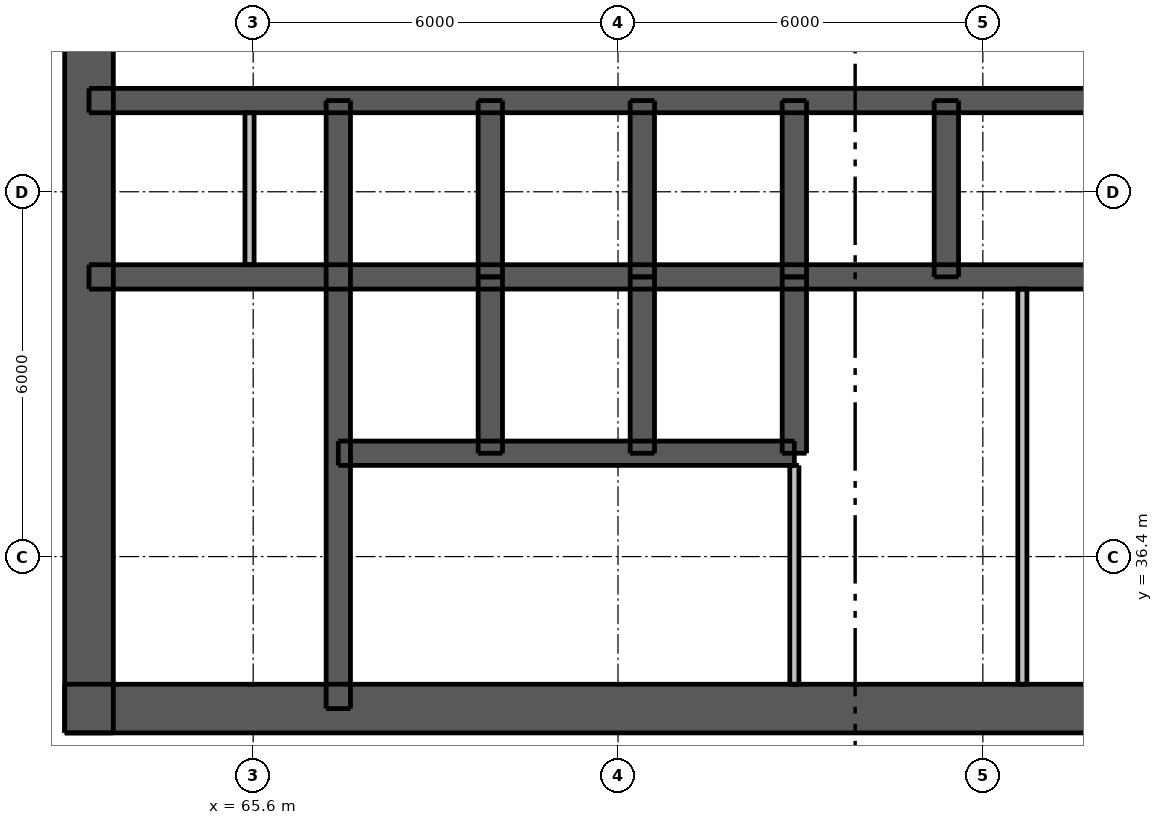
"""IFC4 building model, lengths in metres.
Left out: names, types, materials, properties, quantities, classifications, styles, units other than length and angle.
Written with IfcOpenShell. Run it as: python <this file> out.ifc"""

import sys

from ifc_helpers import new_model, si_unit, direction, frame, frame_2d, origin, place, context, subcontext, project, spatial, rectangle, extrude, element, fill, save


model = new_model("IFC4")
c1 = context("Model", 3, precision=1e-05, world=origin(), true_north=direction((0.0, 1.0)))
c2 = subcontext(c1, "Body", "Model", "MODEL_VIEW")
j1 = project(units=[si_unit("LENGTHUNIT", "METRE"), si_unit("PLANEANGLEUNIT", "RADIAN")], contexts=[c1])
p1 = place(None, origin())
s1 = spatial("IfcSite", under=j1, at=p1, CompositionType="ELEMENT")
p2 = place(p1, origin())
s2 = spatial("IfcBuilding", under=s1, at=p2, CompositionType="ELEMENT")
p3 = place(p2, frame((0.0, 0.0, 95.2)))
s3 = spatial("IfcBuildingStorey", under=s2, at=p3, CompositionType="ELEMENT", Elevation=95.2)
p4 = place(p3, frame((62.5, 33.9, 0.0), z_axis=(0.0, 0.0, 1.0), x_axis=(1.0, 0.0, 0.0)))
e1 = element("IfcWall", 1, at=p4, inside=s3, PredefinedType="SHEAR", context=c2, shape_type="SweptSolid", body=[
    extrude(rectangle(XDim=24.0, YDim=0.8, at=frame_2d((12.0, 0.0))), origin(), (0.0, 0.0, 1.0), 3.05),
])
p5 = place(p4, frame((2.0, 0.0, 0.0)))
e2 = element("IfcOpeningElement", 2, at=p5, cuts=e1, PredefinedType="OPENING", context=c2, shape_type="SweptSolid", body=[
    extrude(rectangle(XDim=1.1, YDim=2.1, at=frame_2d((0.55, 1.05))), frame((0.0, 0.41, 0.0), z_axis=(0.0, -1.0, 0.0), x_axis=(1.0, 0.0, 0.0)), (0.0, 0.0, 1.0), 0.82),
])
p6 = place(p4, frame((20.9, 0.0, 0.0)))
e3 = element("IfcOpeningElement", 3, at=p6, cuts=e1, PredefinedType="OPENING", context=c2, shape_type="SweptSolid", body=[
    extrude(rectangle(XDim=1.1, YDim=2.1, at=frame_2d((0.55, 1.05))), frame((0.0, 0.41, 0.0), z_axis=(0.0, -1.0, 0.0), x_axis=(1.0, 0.0, 0.0)), (0.0, 0.0, 1.0), 0.82),
])
p7 = place(p4, frame((8.0, 0.0, 0.0)))
e4 = element("IfcOpeningElement", 4, at=p7, cuts=e1, PredefinedType="OPENING", context=c2, shape_type="SweptSolid", body=[
    extrude(rectangle(XDim=1.1, YDim=2.1, at=frame_2d((0.55, 1.05))), frame((0.0, 0.41, 0.0), z_axis=(0.0, -1.0, 0.0), x_axis=(1.0, 0.0, 0.0)), (0.0, 0.0, 1.0), 0.82),
])
p8 = place(p4, frame((13.525, 0.0, 0.0)))
e5 = element("IfcOpeningElement", 5, at=p8, cuts=e1, PredefinedType="OPENING", context=c2, shape_type="SweptSolid", body=[
    extrude(rectangle(XDim=0.9, YDim=2.1, at=frame_2d((0.45, 1.05))), frame((0.0, 0.41, 0.0), z_axis=(0.0, -1.0, 0.0), x_axis=(1.0, 0.0, 0.0)), (0.0, 0.0, 1.0), 0.82),
])
p9 = place(p4, frame((17.075, 0.0, 0.0)))
e6 = element("IfcOpeningElement", 6, at=p9, cuts=e1, PredefinedType="OPENING", context=c2, shape_type="SweptSolid", body=[
    extrude(rectangle(XDim=0.9, YDim=2.1, at=frame_2d((0.45, 1.05))), frame((0.0, 0.41, 0.0), z_axis=(0.0, -1.0, 0.0), x_axis=(1.0, 0.0, 0.0)), (0.0, 0.0, 1.0), 0.82),
])
p10 = place(p3, frame((62.9, 33.5, 0.0), z_axis=(0.0, 0.0, 1.0), x_axis=(0.0, 1.0, 0.0)))
e7 = element("IfcWall", 7, at=p10, inside=s3, PredefinedType="SHEAR", context=c2, shape_type="SweptSolid", body=[
    extrude(rectangle(XDim=24.0, YDim=0.8, at=frame_2d((12.0, 0.0))), origin(), (0.0, 0.0, 1.0), 3.05),
])
p11 = place(p10, frame((11.2, 0.0, 0.0)))
e8 = element("IfcOpeningElement", 8, at=p11, cuts=e7, PredefinedType="OPENING", context=c2, shape_type="SweptSolid", body=[
    extrude(rectangle(XDim=1.6, YDim=2.1, at=frame_2d((0.8, 1.05))), frame((0.0, 0.41, 0.0), z_axis=(0.0, -1.0, 0.0), x_axis=(1.0, 0.0, 0.0)), (0.0, 0.0, 1.0), 0.82),
])
p12 = place(p3, frame((62.9, 41.0, 0.0), z_axis=(0.0, 0.0, 1.0), x_axis=(1.0, 0.0, 0.0)))
e9 = element("IfcWall", 9, at=p12, inside=s3, PredefinedType="SHEAR", context=c2, shape_type="SweptSolid", body=[
    extrude(rectangle(XDim=23.2, YDim=0.4, at=frame_2d((11.6, 0.0))), origin(), (0.0, 0.0, 1.0), 3.05),
])
p13 = place(p3, frame((62.9, 43.9, 0.0), z_axis=(0.0, 0.0, 1.0), x_axis=(1.0, 0.0, 0.0)))
e10 = element("IfcWall", 10, at=p13, inside=s3, PredefinedType="SHEAR", context=c2, shape_type="SweptSolid", body=[
    extrude(rectangle(XDim=23.2, YDim=0.4, at=frame_2d((11.6, 0.0))), origin(), (0.0, 0.0, 1.0), 3.05),
])
p14 = place(p13, frame((1.07, 0.0, 0.0)))
e11 = element("IfcOpeningElement", 11, at=p14, cuts=e10, PredefinedType="OPENING", context=c2, shape_type="SweptSolid", body=[
    extrude(rectangle(XDim=0.9, YDim=2.1, at=frame_2d((0.45, 1.05))), frame((0.0, 0.21, 0.0), z_axis=(0.0, -1.0, 0.0), x_axis=(1.0, 0.0, 0.0)), (0.0, 0.0, 1.0), 0.42),
])
p15 = place(p13, frame((2.87, 0.0, 0.0)))
e12 = element("IfcOpeningElement", 12, at=p15, cuts=e10, PredefinedType="OPENING", context=c2, shape_type="SweptSolid", body=[
    extrude(rectangle(XDim=0.8, YDim=2.1, at=frame_2d((0.4, 1.05))), frame((0.0, 0.21, 0.0), z_axis=(0.0, -1.0, 0.0), x_axis=(1.0, 0.0, 0.0)), (0.0, 0.0, 1.0), 0.42),
])
p16 = place(p13, frame((20.6, 0.0, 0.0)))
e13 = element("IfcOpeningElement", 13, at=p16, cuts=e10, PredefinedType="OPENING", context=c2, shape_type="SweptSolid", body=[
    extrude(rectangle(XDim=0.9, YDim=2.1, at=frame_2d((0.45, 1.05))), frame((0.0, 0.21, 0.0), z_axis=(0.0, -1.0, 0.0), x_axis=(1.0, 0.0, 0.0)), (0.0, 0.0, 1.0), 0.42),
])
p17 = place(p13, frame((4.8, 0.0, 0.0)))
e14 = element("IfcOpeningElement", 14, at=p17, cuts=e10, PredefinedType="OPENING", context=c2, shape_type="SweptSolid", body=[
    extrude(rectangle(XDim=1.1, YDim=2.1, at=frame_2d((0.55, 1.05))), frame((0.0, 0.21, 0.0), z_axis=(0.0, -1.0, 0.0), x_axis=(1.0, 0.0, 0.0)), (0.0, 0.0, 1.0), 0.42),
])
p18 = place(p13, frame((7.3, 0.0, 0.0)))
e15 = element("IfcOpeningElement", 15, at=p18, cuts=e10, PredefinedType="OPENING", context=c2, shape_type="SweptSolid", body=[
    extrude(rectangle(XDim=1.1, YDim=2.1, at=frame_2d((0.55, 1.05))), frame((0.0, 0.21, 0.0), z_axis=(0.0, -1.0, 0.0), x_axis=(1.0, 0.0, 0.0)), (0.0, 0.0, 1.0), 0.42),
])
p19 = place(p13, frame((9.8, 0.0, 0.0)))
e16 = element("IfcOpeningElement", 16, at=p19, cuts=e10, PredefinedType="OPENING", context=c2, shape_type="SweptSolid", body=[
    extrude(rectangle(XDim=1.1, YDim=2.1, at=frame_2d((0.55, 1.05))), frame((0.0, 0.21, 0.0), z_axis=(0.0, -1.0, 0.0), x_axis=(1.0, 0.0, 0.0)), (0.0, 0.0, 1.0), 0.42),
])
p20 = place(p13, frame((12.3, 0.0, 0.0)))
e17 = element("IfcOpeningElement", 17, at=p20, cuts=e10, PredefinedType="OPENING", context=c2, shape_type="SweptSolid", body=[
    extrude(rectangle(XDim=1.1, YDim=2.1, at=frame_2d((0.55, 1.05))), frame((0.0, 0.21, 0.0), z_axis=(0.0, -1.0, 0.0), x_axis=(1.0, 0.0, 0.0)), (0.0, 0.0, 1.0), 0.42),
])
p21 = place(p13, frame((14.8, 0.0, 0.0)))
e18 = element("IfcOpeningElement", 18, at=p21, cuts=e10, PredefinedType="OPENING", context=c2, shape_type="SweptSolid", body=[
    extrude(rectangle(XDim=1.1, YDim=2.1, at=frame_2d((0.55, 1.05))), frame((0.0, 0.21, 0.0), z_axis=(0.0, -1.0, 0.0), x_axis=(1.0, 0.0, 0.0)), (0.0, 0.0, 1.0), 0.42),
])
p22 = place(p13, frame((17.3, 0.0, 0.0)))
e19 = element("IfcOpeningElement", 19, at=p22, cuts=e10, PredefinedType="OPENING", context=c2, shape_type="SweptSolid", body=[
    extrude(rectangle(XDim=1.1, YDim=2.1, at=frame_2d((0.55, 1.05))), frame((0.0, 0.21, 0.0), z_axis=(0.0, -1.0, 0.0), x_axis=(1.0, 0.0, 0.0)), (0.0, 0.0, 1.0), 0.42),
])
p23 = place(p3, frame((67.0, 33.9, 0.0), z_axis=(0.0, 0.0, 1.0), x_axis=(0.0, 1.0, 0.0)))
e20 = element("IfcWall", 20, at=p23, inside=s3, PredefinedType="SHEAR", context=c2, shape_type="SweptSolid", body=[
    extrude(rectangle(XDim=10.0, YDim=0.4, at=frame_2d((5.0, 0.0))), origin(), (0.0, 0.0, 1.0), 3.05),
])
p24 = place(p23, frame((0.6, 0.0, 0.0)))
e21 = element("IfcOpeningElement", 21, at=p24, cuts=e20, PredefinedType="OPENING", context=c2, shape_type="SweptSolid", body=[
    extrude(rectangle(XDim=1.1, YDim=2.1, at=frame_2d((0.55, 1.05))), frame((0.0, 0.21, 0.0), z_axis=(0.0, -1.0, 0.0), x_axis=(1.0, 0.0, 0.0)), (0.0, 0.0, 1.0), 0.42),
])
for number, where, z_axis, x_axis in (
    (22, (69.5, 41.0, 0.0), (0.0, 0.0, 1.0), (0.0, 1.0, 0.0)),
    (23, (72.0, 41.0, 0.0), (0.0, 0.0, 1.0), (0.0, 1.0, 0.0)),
    (24, (74.5, 41.0, 0.0), (0.0, 0.0, 1.0), (0.0, 1.0, 0.0)),
    (25, (77.0, 41.0, 0.0), (0.0, 0.0, 1.0), (0.0, 1.0, 0.0)),
):
    element("IfcWall", number, at=place(p3, frame(where, z_axis=z_axis, x_axis=x_axis)), inside=s3, PredefinedType="SHEAR", context=c2, shape_type="SweptSolid", body=[
        extrude(rectangle(XDim=2.9, YDim=0.4, at=frame_2d((1.45, 0.0))), origin(), (0.0, 0.0, 1.0), 3.05),
    ])
p25 = place(p3, frame((67.0, 38.1, 0.0), z_axis=(0.0, 0.0, 1.0), x_axis=(1.0, 0.0, 0.0)))
e26 = element("IfcWall", 26, at=p25, inside=s3, PredefinedType="SHEAR", context=c2, shape_type="SweptSolid", body=[
    extrude(rectangle(XDim=7.5, YDim=0.4, at=frame_2d((3.75, 0.0))), origin(), (0.0, 0.0, 1.0), 3.05),
])
p26 = place(p25, frame((0.7, 0.0, 0.0)))
e27 = element("IfcOpeningElement", 27, at=p26, cuts=e26, PredefinedType="OPENING", context=c2, shape_type="SweptSolid", body=[
    extrude(rectangle(XDim=1.1, YDim=2.1, at=frame_2d((0.55, 1.05))), frame((0.0, 0.21, 0.0), z_axis=(0.0, -1.0, 0.0), x_axis=(1.0, 0.0, 0.0)), (0.0, 0.0, 1.0), 0.42),
])
p27 = place(p25, frame((3.2, 0.0, 0.0)))
e28 = element("IfcOpeningElement", 28, at=p27, cuts=e26, PredefinedType="OPENING", context=c2, shape_type="SweptSolid", body=[
    extrude(rectangle(XDim=1.1, YDim=2.1, at=frame_2d((0.55, 1.05))), frame((0.0, 0.21, 0.0), z_axis=(0.0, -1.0, 0.0), x_axis=(1.0, 0.0, 0.0)), (0.0, 0.0, 1.0), 0.42),
])
p28 = place(p25, frame((5.65, 0.0, 0.0)))
e29 = element("IfcOpeningElement", 29, at=p28, cuts=e26, PredefinedType="OPENING", context=c2, shape_type="SweptSolid", body=[
    extrude(rectangle(XDim=1.2, YDim=2.1, at=frame_2d((0.6, 1.05))), frame((0.0, 0.21, 0.0), z_axis=(0.0, -1.0, 0.0), x_axis=(1.0, 0.0, 0.0)), (0.0, 0.0, 1.0), 0.42),
])
for number, where, z_axis, x_axis in (
    (30, (69.5, 38.1, 0.0), (0.0, 0.0, 1.0), (0.0, 1.0, 0.0)),
    (31, (72.0, 38.1, 0.0), (0.0, 0.0, 1.0), (0.0, 1.0, 0.0)),
    (32, (74.5, 38.1, 0.0), (0.0, 0.0, 1.0), (0.0, 1.0, 0.0)),
):
    element("IfcWall", number, at=place(p3, frame(where, z_axis=z_axis, x_axis=x_axis)), inside=s3, PredefinedType="SHEAR", context=c2, shape_type="SweptSolid", body=[
        extrude(rectangle(XDim=2.9, YDim=0.4, at=frame_2d((1.45, 0.0))), origin(), (0.0, 0.0, 1.0), 3.05),
    ])
p29 = place(p3, frame((74.5, 34.3, 0.0), z_axis=(0.0, 0.0, 1.0), x_axis=(0.0, 1.0, 0.0)))
e33 = element("IfcWall", 33, at=p29, inside=s3, PredefinedType="PLUMBINGWALL", context=c2, shape_type="SweptSolid", body=[
    extrude(rectangle(XDim=3.6, YDim=0.15, at=frame_2d((1.8, 0.0))), origin(), (0.0, 0.0, 1.0), 3.05),
])
p30 = place(p3, frame((78.25, 34.3, 0.0), z_axis=(0.0, 0.0, 1.0), x_axis=(0.0, 1.0, 0.0)))
e34 = element("IfcWall", 34, at=p30, inside=s3, PredefinedType="PLUMBINGWALL", context=c2, shape_type="SweptSolid", body=[
    extrude(rectangle(XDim=6.5, YDim=0.15, at=frame_2d((3.25, 0.0))), origin(), (0.0, 0.0, 1.0), 3.05),
])
p31 = place(p3, frame((65.54, 41.2, 0.0), z_axis=(0.0, 0.0, 1.0), x_axis=(0.0, 1.0, 0.0)))
e35 = element("IfcWall", 35, at=p31, inside=s3, PredefinedType="PLUMBINGWALL", context=c2, shape_type="SweptSolid", body=[
    extrude(rectangle(XDim=2.5, YDim=0.15, at=frame_2d((1.25, 0.0))), origin(), (0.0, 0.0, 1.0), 3.05),
])
p32 = place(p5, origin())
e36 = element("IfcDoor", 36, at=p32, inside=s3, OperationType="SINGLE_SWING_LEFT", PredefinedType="DOOR", context=c2, shape_type="SweptSolid", body=[
    extrude(rectangle(XDim=1.1, YDim=2.1, at=frame_2d((0.55, 1.05))), frame((0.0, 0.388, 0.0), z_axis=(0.0, -1.0, 0.0), x_axis=(1.0, 0.0, 0.0)), (0.0, 0.0, 1.0), 0.05),
])
fill(e2, e36)
p33 = place(p7, origin())
e37 = element("IfcDoor", 37, at=p33, inside=s3, OperationType="SINGLE_SWING_LEFT", PredefinedType="DOOR", context=c2, shape_type="SweptSolid", body=[
    extrude(rectangle(XDim=1.1, YDim=2.1, at=frame_2d((0.55, 1.05))), frame((0.0, 0.388, 0.0), z_axis=(0.0, -1.0, 0.0), x_axis=(1.0, 0.0, 0.0)), (0.0, 0.0, 1.0), 0.05),
])
fill(e4, e37)
p34 = place(p24, origin())
e38 = element("IfcDoor", 38, at=p34, inside=s3, OperationType="SINGLE_SWING_RIGHT", PredefinedType="DOOR", context=c2, shape_type="SweptSolid", body=[
    extrude(rectangle(XDim=1.1, YDim=2.1, at=frame_2d((0.55, 1.05))), frame((0.0, -0.138, 0.0), z_axis=(0.0, -1.0, 0.0), x_axis=(1.0, 0.0, 0.0)), (0.0, 0.0, 1.0), 0.05),
])
fill(e21, e38)
p35 = place(p8, origin())
e39 = element("IfcDoor", 39, at=p35, inside=s3, OperationType="SINGLE_SWING_LEFT", PredefinedType="DOOR", context=c2, shape_type="SweptSolid", body=[
    extrude(rectangle(XDim=0.9, YDim=2.1, at=frame_2d((0.45, 1.05))), frame((0.0, 0.388, 0.0), z_axis=(0.0, -1.0, 0.0), x_axis=(1.0, 0.0, 0.0)), (0.0, 0.0, 1.0), 0.05),
])
fill(e5, e39)
p36 = place(p14, origin())
e40 = element("IfcDoor", 40, at=p36, inside=s3, OperationType="SINGLE_SWING_LEFT", PredefinedType="DOOR", context=c2, shape_type="SweptSolid", body=[
    extrude(rectangle(XDim=0.9, YDim=2.1, at=frame_2d((0.45, 1.05))), frame((0.0, -0.138, 0.0), z_axis=(0.0, -1.0, 0.0), x_axis=(1.0, 0.0, 0.0)), (0.0, 0.0, 1.0), 0.05),
])
fill(e11, e40)
p37 = place(p15, origin())
e41 = element("IfcDoor", 41, at=p37, inside=s3, OperationType="SINGLE_SWING_RIGHT", PredefinedType="DOOR", context=c2, shape_type="SweptSolid", body=[
    extrude(rectangle(XDim=0.8, YDim=2.1, at=frame_2d((0.4, 1.05))), frame((0.0, -0.138, 0.0), z_axis=(0.0, -1.0, 0.0), x_axis=(1.0, 0.0, 0.0)), (0.0, 0.0, 1.0), 0.05),
])
fill(e12, e41)
p38 = place(p17, origin())
e42 = element("IfcDoor", 42, at=p38, inside=s3, OperationType="DOUBLE_DOOR_SLIDING", PredefinedType="DOOR", context=c2, shape_type="SweptSolid", body=[
    extrude(rectangle(XDim=1.1, YDim=2.1, at=frame_2d((0.55, 1.05))), frame((0.0, 0.025, 0.0), z_axis=(0.0, -1.0, 0.0), x_axis=(1.0, 0.0, 0.0)), (0.0, 0.0, 1.0), 0.05),
])
fill(e14, e42)
p39 = place(p18, origin())
e43 = element("IfcDoor", 43, at=p39, inside=s3, OperationType="DOUBLE_DOOR_SLIDING", PredefinedType="DOOR", context=c2, shape_type="SweptSolid", body=[
    extrude(rectangle(XDim=1.1, YDim=2.1, at=frame_2d((0.55, 1.05))), frame((0.0, 0.025, 0.0), z_axis=(0.0, -1.0, 0.0), x_axis=(1.0, 0.0, 0.0)), (0.0, 0.0, 1.0), 0.05),
])
fill(e15, e43)
p40 = place(p19, origin())
e44 = element("IfcDoor", 44, at=p40, inside=s3, OperationType="DOUBLE_DOOR_SLIDING", PredefinedType="DOOR", context=c2, shape_type="SweptSolid", body=[
    extrude(rectangle(XDim=1.1, YDim=2.1, at=frame_2d((0.55, 1.05))), frame((0.0, 0.025, 0.0), z_axis=(0.0, -1.0, 0.0), x_axis=(1.0, 0.0, 0.0)), (0.0, 0.0, 1.0), 0.05),
])
fill(e16, e44)
p41 = place(p20, origin())
e45 = element("IfcDoor", 45, at=p41, inside=s3, OperationType="DOUBLE_DOOR_SLIDING", PredefinedType="DOOR", context=c2, shape_type="SweptSolid", body=[
    extrude(rectangle(XDim=1.1, YDim=2.1, at=frame_2d((0.55, 1.05))), frame((0.0, 0.025, 0.0), z_axis=(0.0, -1.0, 0.0), x_axis=(1.0, 0.0, 0.0)), (0.0, 0.0, 1.0), 0.05),
])
fill(e17, e45)
p42 = place(p21, origin())
e46 = element("IfcDoor", 46, at=p42, inside=s3, OperationType="DOUBLE_DOOR_SLIDING", PredefinedType="DOOR", context=c2, shape_type="SweptSolid", body=[
    extrude(rectangle(XDim=1.1, YDim=2.1, at=frame_2d((0.55, 1.05))), frame((0.0, 0.025, 0.0), z_axis=(0.0, -1.0, 0.0), x_axis=(1.0, 0.0, 0.0)), (0.0, 0.0, 1.0), 0.05),
])
fill(e18, e46)
p43 = place(p26, origin())
e47 = element("IfcDoor", 47, at=p43, inside=s3, OperationType="DOUBLE_DOOR_SLIDING", PredefinedType="DOOR", context=c2, shape_type="SweptSolid", body=[
    extrude(rectangle(XDim=1.1, YDim=2.1, at=frame_2d((0.55, 1.05))), frame((0.0, 0.025, 0.0), z_axis=(0.0, -1.0, 0.0), x_axis=(1.0, 0.0, 0.0)), (0.0, 0.0, 1.0), 0.05),
])
fill(e27, e47)
p44 = place(p27, origin())
e48 = element("IfcDoor", 48, at=p44, inside=s3, OperationType="DOUBLE_DOOR_SLIDING", PredefinedType="DOOR", context=c2, shape_type="SweptSolid", body=[
    extrude(rectangle(XDim=1.1, YDim=2.1, at=frame_2d((0.55, 1.05))), frame((0.0, 0.025, 0.0), z_axis=(0.0, -1.0, 0.0), x_axis=(1.0, 0.0, 0.0)), (0.0, 0.0, 1.0), 0.05),
])
fill(e28, e48)
p45 = place(p28, origin())
e49 = element("IfcDoor", 49, at=p45, inside=s3, OperationType="DOUBLE_DOOR_SLIDING", PredefinedType="DOOR", context=c2, shape_type="SweptSolid", body=[
    extrude(rectangle(XDim=1.2, YDim=2.1, at=frame_2d((0.6, 1.05))), frame((0.0, 0.025, 0.0), z_axis=(0.0, -1.0, 0.0), x_axis=(1.0, 0.0, 0.0)), (0.0, 0.0, 1.0), 0.05),
])
fill(e29, e49)
save(model, sys.argv[1])
